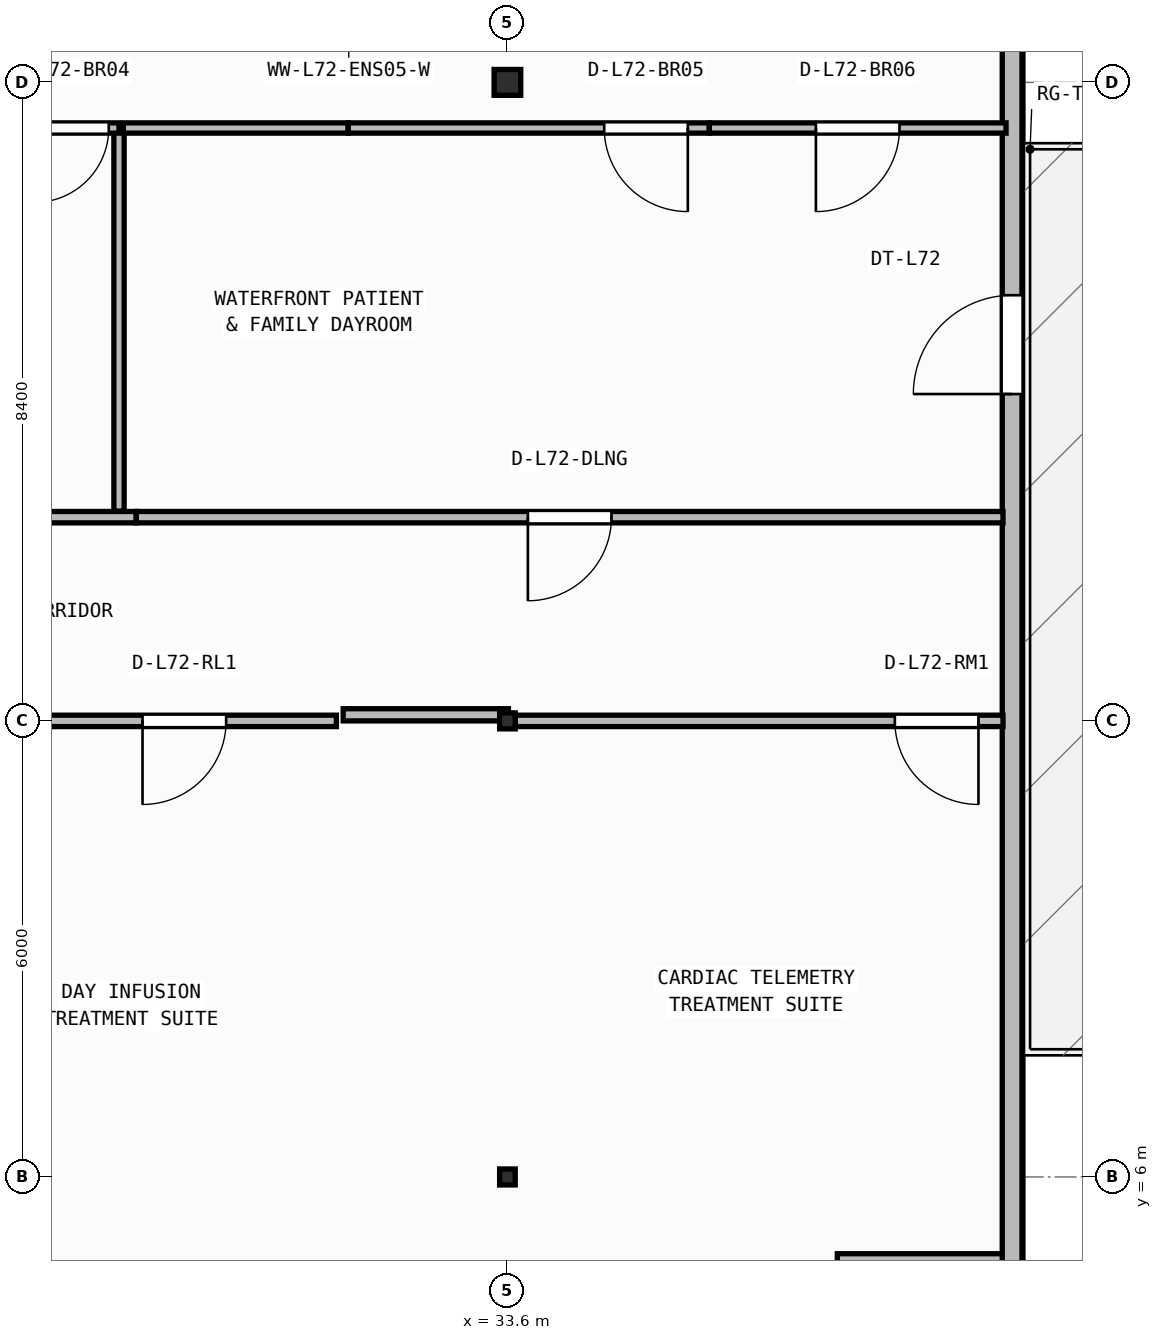
"""IFC4 building model, lengths in metres.
Left out: names, types, materials, properties, quantities, classifications, styles, units other than length and angle.
Written with IfcOpenShell. Run it as: python <this file> out.ifc"""

import sys

from ifc_helpers import new_model, si_unit, direction, frame, frame_2d, origin, origin_2d, place, context, subcontext, project, spatial, rectangle, i_section, extrude, element, fill, save


model = new_model("IFC4")
c1 = context("Model", 3, precision=1e-05, world=origin(), true_north=direction((0.0, 1.0)))
c2 = subcontext(c1, "Body", "Model", "MODEL_VIEW")
j1 = project(units=[si_unit("LENGTHUNIT", "METRE"), si_unit("PLANEANGLEUNIT", "RADIAN")], contexts=[c1])
p1 = place(None, origin())
s1 = spatial("IfcSite", under=j1, at=p1, CompositionType="ELEMENT")
p2 = place(p1, origin())
s2 = spatial("IfcBuilding", under=s1, at=p2, CompositionType="ELEMENT")
p3 = place(p2, frame((0.0, 0.0, 292.1)))
s3 = spatial("IfcBuildingStorey", under=s2, at=p3, CompositionType="ELEMENT", Elevation=292.1)
for number, where, z_axis, x_axis in (
    (1, (33.6, 6.0, 0.0), (0.0, 0.0, 1.0), (1.0, 0.0, 0.0)),
    (2, (33.6, 12.0, 0.0), (0.0, 0.0, 1.0), (1.0, 0.0, 0.0)),
):
    element("IfcColumn", number, at=place(p3, frame(where, z_axis=z_axis, x_axis=x_axis)), inside=s3, PredefinedType="COLUMN", context=c2, shape_type="SweptSolid", body=[
        extrude(i_section(OverallWidth=0.205, OverallDepth=0.21, WebThickness=0.009, FlangeThickness=0.014, FilletRadius=0.011, at=origin_2d()), origin(), (0.0, 0.0, 1.0), 3.95),
    ])
p4 = place(p3, frame((33.6, 20.4, 0.0), z_axis=(0.0, 0.0, 1.0), x_axis=(1.0, 0.0, 0.0)))
e3 = element("IfcColumn", 3, at=p4, inside=s3, PredefinedType="COLUMN", context=c2, shape_type="SweptSolid", body=[
    extrude(i_section(OverallWidth=0.35, OverallDepth=0.34, WebThickness=0.016, FlangeThickness=0.028, at=origin_2d()), origin(), (0.0, 0.0, 1.0), 3.95),
])
p5 = place(p3, frame((37.94, 4.86, 0.0), z_axis=(0.0, 0.0, 1.0), x_axis=(1.0, 0.0, 0.0)))
e4 = element("IfcWall", 4, at=p5, inside=s3, PredefinedType="STANDARD", context=c2, shape_type="SweptSolid", body=[
    extrude(rectangle(XDim=2.3, YDim=0.26, at=frame_2d((1.15, 0.0))), origin(), (0.0, 0.0, 1.0), 3.71),
])
p6 = place(p3, frame((40.24, 4.86, 0.0), z_axis=(0.0, 0.0, 1.0), x_axis=(0.0, 1.0, 0.0)))
e5 = element("IfcWall", 5, at=p6, inside=s3, PredefinedType="STANDARD", context=c2, shape_type="SweptSolid", body=[
    extrude(rectangle(XDim=20.48, YDim=0.26, at=frame_2d((10.24, 0.0))), origin(), (0.0, 0.0, 1.0), 3.71),
])
p7 = place(p6, frame((11.44, 0.0, 0.0)))
e6 = element("IfcOpeningElement", 6, at=p7, cuts=e5, PredefinedType="OPENING", context=c2, shape_type="SweptSolid", body=[
    extrude(rectangle(XDim=1.3, YDim=2.15, at=frame_2d((0.65, 1.075))), frame((0.0, 0.14, 0.0), z_axis=(0.0, -1.0, 0.0), x_axis=(1.0, 0.0, 0.0)), (0.0, 0.0, 1.0), 0.28),
])
p8 = place(p3, frame((31.35, 12.0, 0.0), z_axis=(0.0, 0.0, 1.0), x_axis=(-1.0, 0.0, 0.0)))
e7 = element("IfcWall", 7, at=p8, inside=s3, PredefinedType="PARTITIONING", context=c2, shape_type="SweptSolid", body=[
    extrude(rectangle(XDim=6.048, YDim=0.15, at=frame_2d((3.024, 0.0))), origin(), (0.0, 0.0, 1.0), 3.157),
])
p9 = place(p8, frame((1.451, 0.0, 0.0)))
e8 = element("IfcOpeningElement", 8, at=p9, cuts=e7, PredefinedType="OPENING", context=c2, shape_type="SweptSolid", body=[
    extrude(rectangle(XDim=1.1, YDim=2.1, at=frame_2d((0.55, 1.05))), frame((0.0, 0.085, 0.0), z_axis=(0.0, -1.0, 0.0), x_axis=(1.0, 0.0, 0.0)), (0.0, 0.0, 1.0), 0.17),
])
p10 = place(p3, frame((40.12, 12.0, 0.0), z_axis=(0.0, 0.0, 1.0), x_axis=(-1.0, 0.0, 0.0)))
e9 = element("IfcWall", 9, at=p10, inside=s3, PredefinedType="PARTITIONING", context=c2, shape_type="SweptSolid", body=[
    extrude(rectangle(XDim=6.418, YDim=0.15, at=frame_2d((3.209, 0.0))), origin(), (0.0, 0.0, 1.0), 3.71),
])
p11 = place(p10, frame((0.323, 0.0, 0.0)))
e10 = element("IfcOpeningElement", 10, at=p11, cuts=e9, PredefinedType="OPENING", context=c2, shape_type="SweptSolid", body=[
    extrude(rectangle(XDim=1.1, YDim=2.1, at=frame_2d((0.55, 1.05))), frame((0.0, 0.085, 0.0), z_axis=(0.0, -1.0, 0.0), x_axis=(1.0, 0.0, 0.0)), (0.0, 0.0, 1.0), 0.17),
])
p12 = place(p3, frame((28.716, 14.68, 0.0), z_axis=(0.0, 0.0, 1.0), x_axis=(-1.0, 0.0, 0.0)))
e11 = element("IfcWall", 11, at=p12, inside=s3, PredefinedType="PARTITIONING", context=c2, shape_type="SweptSolid", body=[
    extrude(rectangle(XDim=15.162, YDim=0.15, at=frame_2d((7.581, 0.0))), origin(), (0.0, 0.0, 1.0), 3.71),
])
p13 = place(p12, frame((7.031, 0.0, 0.0)))
e12 = element("IfcOpeningElement", 12, at=p13, cuts=e11, PredefinedType="OPENING", context=c2, shape_type="SweptSolid", body=[
    extrude(rectangle(XDim=1.1, YDim=2.1, at=frame_2d((0.55, 1.05))), frame((0.0, 0.085, 0.0), z_axis=(0.0, -1.0, 0.0), x_axis=(1.0, 0.0, 0.0)), (0.0, 0.0, 1.0), 0.17),
])
p14 = place(p3, frame((40.12, 14.68, 0.0), z_axis=(0.0, 0.0, 1.0), x_axis=(-1.0, 0.0, 0.0)))
e13 = element("IfcWall", 13, at=p14, inside=s3, PredefinedType="PARTITIONING", context=c2, shape_type="SweptSolid", body=[
    extrude(rectangle(XDim=11.402, YDim=0.15, at=frame_2d((5.701, 0.0))), origin(), (0.0, 0.0, 1.0), 3.71),
])
p15 = place(p14, frame((5.151, 0.0, 0.0)))
e14 = element("IfcOpeningElement", 14, at=p15, cuts=e13, PredefinedType="OPENING", context=c2, shape_type="SweptSolid", body=[
    extrude(rectangle(XDim=1.1, YDim=2.1, at=frame_2d((0.55, 1.05))), frame((0.0, 0.085, 0.0), z_axis=(0.0, -1.0, 0.0), x_axis=(1.0, 0.0, 0.0)), (0.0, 0.0, 1.0), 0.17),
])
p16 = place(p3, frame((28.49, 14.76, 0.0), z_axis=(0.0, 0.0, 1.0), x_axis=(0.0, 1.0, 0.0)))
e15 = element("IfcWall", 15, at=p16, inside=s3, PredefinedType="PARTITIONING", context=c2, shape_type="SweptSolid", body=[
    extrude(rectangle(XDim=5.04, YDim=0.135, at=frame_2d((2.52, 0.0))), origin(), (0.0, 0.0, 1.0), 3.71),
])
p17 = place(p3, frame((28.49, 19.8, 0.0), z_axis=(0.0, 0.0, 1.0), x_axis=(-1.0, 0.0, 0.0)))
e16 = element("IfcWall", 16, at=p17, inside=s3, PredefinedType="PARTITIONING", context=c2, shape_type="SweptSolid", body=[
    extrude(rectangle(XDim=1.383, YDim=0.135, at=frame_2d((0.692, 0.0))), origin(), (0.0, 0.0, 1.0), 3.71),
])
p18 = place(p17, frame((0.135, 0.0, 0.0)))
e17 = element("IfcOpeningElement", 17, at=p18, cuts=e16, PredefinedType="OPENING", context=c2, shape_type="SweptSolid", body=[
    extrude(rectangle(XDim=0.98, YDim=2.1, at=frame_2d((0.49, 1.05))), frame((0.0, 0.077, 0.0), z_axis=(0.0, -1.0, 0.0), x_axis=(1.0, 0.0, 0.0)), (0.0, 0.0, 1.0), 0.155),
])
p19 = place(p3, frame((31.505, 19.8, 0.0), z_axis=(0.0, 0.0, 1.0), x_axis=(-1.0, 0.0, 0.0)))
e18 = element("IfcWall", 18, at=p19, inside=s3, PredefinedType="PARTITIONING", context=c2, shape_type="SweptSolid", body=[
    extrude(rectangle(XDim=2.957, YDim=0.135, at=frame_2d((1.479, 0.0))), origin(), (0.0, 0.0, 1.0), 3.71),
])
p20 = place(p3, frame((36.255, 19.8, 0.0), z_axis=(0.0, 0.0, 1.0), x_axis=(-1.0, 0.0, 0.0)))
e19 = element("IfcWall", 19, at=p20, inside=s3, PredefinedType="PARTITIONING", context=c2, shape_type="SweptSolid", body=[
    extrude(rectangle(XDim=4.748, YDim=0.135, at=frame_2d((2.374, 0.0))), origin(), (0.0, 0.0, 1.0), 3.71),
])
p21 = place(p20, frame((0.281, 0.0, 0.0)))
e20 = element("IfcOpeningElement", 20, at=p21, cuts=e19, PredefinedType="OPENING", context=c2, shape_type="SweptSolid", body=[
    extrude(rectangle(XDim=1.1, YDim=2.1, at=frame_2d((0.55, 1.05))), frame((0.0, 0.077, 0.0), z_axis=(0.0, -1.0, 0.0), x_axis=(1.0, 0.0, 0.0)), (0.0, 0.0, 1.0), 0.155),
])
p22 = place(p3, frame((40.16, 19.8, 0.0), z_axis=(0.0, 0.0, 1.0), x_axis=(-1.0, 0.0, 0.0)))
e21 = element("IfcWall", 21, at=p22, inside=s3, PredefinedType="PARTITIONING", context=c2, shape_type="SweptSolid", body=[
    extrude(rectangle(XDim=3.903, YDim=0.135, at=frame_2d((1.952, 0.0))), origin(), (0.0, 0.0, 1.0), 3.71),
])
p23 = place(p22, frame((1.402, 0.0, 0.0)))
e22 = element("IfcOpeningElement", 22, at=p23, cuts=e21, PredefinedType="OPENING", context=c2, shape_type="SweptSolid", body=[
    extrude(rectangle(XDim=1.1, YDim=2.1, at=frame_2d((0.55, 1.05))), frame((0.0, 0.077, 0.0), z_axis=(0.0, -1.0, 0.0), x_axis=(1.0, 0.0, 0.0)), (0.0, 0.0, 1.0), 0.155),
])
p24 = place(p3, frame((31.439, 12.08, 0.0), z_axis=(0.0, 0.0, 1.0), x_axis=(1.0, 0.0, 0.0)))
e23 = element("IfcWall", 23, at=p24, inside=s3, PredefinedType="PARTITIONING", context=c2, shape_type="SweptSolid", body=[
    extrude(rectangle(XDim=2.174, YDim=0.16, at=frame_2d((1.087, 0.0))), origin(), (0.0, 0.0, 1.0), 3.157),
])
p25 = place(p7, origin())
e24 = element("IfcDoor", 24, at=p25, inside=s3, OperationType="SINGLE_SWING_LEFT", PredefinedType="DOOR", context=c2, shape_type="SweptSolid", body=[
    extrude(rectangle(XDim=1.3, YDim=2.15, at=frame_2d((0.65, 1.075))), frame((0.0, 0.025, 0.0), z_axis=(0.0, -1.0, 0.0), x_axis=(1.0, 0.0, 0.0)), (0.0, 0.0, 1.0), 0.05),
])
fill(e6, e24)
p26 = place(p9, origin())
e25 = element("IfcDoor", 25, at=p26, inside=s3, OperationType="SINGLE_SWING_RIGHT", PredefinedType="DOOR", context=c2, shape_type="SweptSolid", body=[
    extrude(rectangle(XDim=1.1, YDim=2.1, at=frame_2d((0.55, 1.05))), frame((0.0, 0.025, 0.0), z_axis=(0.0, -1.0, 0.0), x_axis=(1.0, 0.0, 0.0)), (0.0, 0.0, 1.0), 0.05),
])
fill(e8, e25)
p27 = place(p11, origin())
e26 = element("IfcDoor", 26, at=p27, inside=s3, OperationType="SINGLE_SWING_LEFT", PredefinedType="DOOR", context=c2, shape_type="SweptSolid", body=[
    extrude(rectangle(XDim=1.1, YDim=2.1, at=frame_2d((0.55, 1.05))), frame((0.0, 0.025, 0.0), z_axis=(0.0, -1.0, 0.0), x_axis=(1.0, 0.0, 0.0)), (0.0, 0.0, 1.0), 0.05),
])
fill(e10, e26)
p28 = place(p15, origin())
e27 = element("IfcDoor", 27, at=p28, inside=s3, OperationType="SINGLE_SWING_RIGHT", PredefinedType="DOOR", context=c2, shape_type="SweptSolid", body=[
    extrude(rectangle(XDim=1.1, YDim=2.1, at=frame_2d((0.55, 1.05))), frame((0.0, 0.025, 0.0), z_axis=(0.0, -1.0, 0.0), x_axis=(1.0, 0.0, 0.0)), (0.0, 0.0, 1.0), 0.05),
])
fill(e14, e27)
p29 = place(p18, origin())
e28 = element("IfcDoor", 28, at=p29, inside=s3, OperationType="SINGLE_SWING_RIGHT", PredefinedType="DOOR", context=c2, shape_type="SweptSolid", body=[
    extrude(rectangle(XDim=0.98, YDim=2.1, at=frame_2d((0.49, 1.05))), frame((0.0, 0.025, 0.0), z_axis=(0.0, -1.0, 0.0), x_axis=(1.0, 0.0, 0.0)), (0.0, 0.0, 1.0), 0.05),
])
fill(e17, e28)
p30 = place(p21, origin())
e29 = element("IfcDoor", 29, at=p30, inside=s3, OperationType="SINGLE_SWING_LEFT", PredefinedType="DOOR", context=c2, shape_type="SweptSolid", body=[
    extrude(rectangle(XDim=1.1, YDim=2.1, at=frame_2d((0.55, 1.05))), frame((0.0, 0.025, 0.0), z_axis=(0.0, -1.0, 0.0), x_axis=(1.0, 0.0, 0.0)), (0.0, 0.0, 1.0), 0.05),
])
fill(e20, e29)
p31 = place(p23, origin())
e30 = element("IfcDoor", 30, at=p31, inside=s3, OperationType="SINGLE_SWING_RIGHT", PredefinedType="DOOR", context=c2, shape_type="SweptSolid", body=[
    extrude(rectangle(XDim=1.1, YDim=2.1, at=frame_2d((0.55, 1.05))), frame((0.0, 0.025, 0.0), z_axis=(0.0, -1.0, 0.0), x_axis=(1.0, 0.0, 0.0)), (0.0, 0.0, 1.0), 0.05),
])
fill(e22, e30)
save(model, sys.argv[1])
